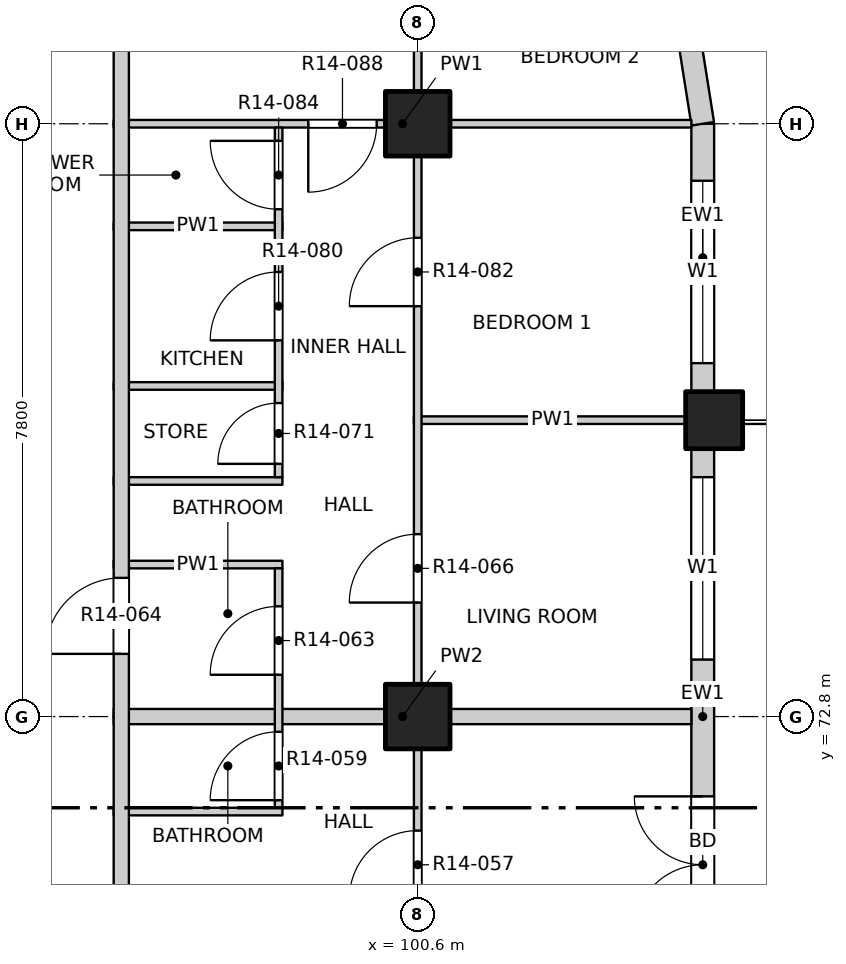
"""IFC4 building model, lengths in metres.
Left out: names, types, materials, properties, quantities, classifications, styles, units other than length and angle.
Written with IfcOpenShell. Run it as: python <this file> out.ifc"""

import sys

from ifc_helpers import new_model, si_unit, direction, frame, frame_2d, origin, origin_2d, place, context, subcontext, project, spatial, rectangle, extrude, element, fill, save


model = new_model("IFC4")
c1 = context("Model", 3, precision=1e-05, world=origin(), true_north=direction((0.0, 1.0)))
c2 = subcontext(c1, "Body", "Model", "MODEL_VIEW")
j1 = project(units=[si_unit("LENGTHUNIT", "METRE"), si_unit("PLANEANGLEUNIT", "RADIAN")], contexts=[c1])
p1 = place(None, origin())
s1 = spatial("IfcSite", under=j1, at=p1, CompositionType="ELEMENT")
p2 = place(p1, origin())
s2 = spatial("IfcBuilding", under=s1, at=p2, CompositionType="ELEMENT")
p3 = place(p2, frame((0.0, 0.0, 152.0)))
s3 = spatial("IfcBuildingStorey", under=s2, at=p3, CompositionType="ELEMENT", Elevation=152.0)
p4 = place(p3, frame((104.5, 76.7, -0.25), z_axis=(0.0, 0.0, 1.0), x_axis=(1.0, 0.0, 0.0)))
e1 = element("IfcColumn", 1, at=p4, inside=s3, PredefinedType="COLUMN", context=c2, shape_type="SweptSolid", body=[
    extrude(rectangle(XDim=0.75, YDim=0.75, at=origin_2d()), origin(), (0.0, 0.0, 1.0), 3.4),
])
for number, where, z_axis, x_axis in (
    (2, (100.6, 72.8, -0.25), (0.0, 0.0, 1.0), (1.0, 0.0, 0.0)),
    (3, (100.6, 80.6, -0.25), (0.0, 0.0, 1.0), (1.0, 0.0, 0.0)),
):
    element("IfcColumn", number, at=place(p3, frame(where, z_axis=z_axis, x_axis=x_axis)), inside=s3, PredefinedType="COLUMN", context=c2, shape_type="SweptSolid", body=[
        extrude(rectangle(XDim=0.85, YDim=0.85, at=origin_2d()), origin(), (0.0, 0.0, 1.0), 3.4),
    ])
p5 = place(p3, frame((104.35, 69.275, 0.0), z_axis=(0.0, 0.0, 1.0), x_axis=(0.0, 1.0, 0.0)))
e4 = element("IfcWall", 4, at=p5, inside=s3, PredefinedType="SOLIDWALL", context=c2, shape_type="SweptSolid", body=[
    extrude(rectangle(XDim=7.05, YDim=0.3, at=frame_2d((3.525, 0.0))), origin(), (0.0, 0.0, 1.0), 2.7),
])
p6 = place(p5, frame((0.675, 0.0, 0.0)))
e5 = element("IfcOpeningElement", 5, at=p6, cuts=e4, PredefinedType="OPENING", context=c2, shape_type="SweptSolid", body=[
    extrude(rectangle(XDim=1.8, YDim=2.4, at=frame_2d((0.9, 1.2))), frame((0.0, 0.16, 0.0), z_axis=(0.0, -1.0, 0.0), x_axis=(1.0, 0.0, 0.0)), (0.0, 0.0, 1.0), 0.32),
])
p7 = place(p5, frame((4.275, 0.0, 0.9)))
e6 = element("IfcOpeningElement", 6, at=p7, cuts=e4, PredefinedType="OPENING", context=c2, shape_type="SweptSolid", body=[
    extrude(rectangle(XDim=2.4, YDim=1.8, at=frame_2d((1.2, 0.9))), frame((0.0, 0.16, 0.0), z_axis=(0.0, -1.0, 0.0), x_axis=(1.0, 0.0, 0.0)), (0.0, 0.0, 1.0), 0.32),
])
p8 = place(p3, frame((104.35, 77.075, 0.0), z_axis=(0.0, 0.0, 1.0), x_axis=(0.0, 1.0, 0.0)))
e7 = element("IfcWall", 7, at=p8, inside=s3, PredefinedType="SOLIDWALL", context=c2, shape_type="SweptSolid", body=[
    extrude(rectangle(XDim=3.525, YDim=0.3, at=frame_2d((1.763, 0.0))), origin(), (0.0, 0.0, 1.0), 2.7),
])
p9 = place(p8, frame((0.375, 0.0, 0.9)))
e8 = element("IfcOpeningElement", 8, at=p9, cuts=e7, PredefinedType="OPENING", context=c2, shape_type="SweptSolid", body=[
    extrude(rectangle(XDim=2.4, YDim=1.8, at=frame_2d((1.2, 0.9))), frame((0.0, 0.16, 0.0), z_axis=(0.0, -1.0, 0.0), x_axis=(1.0, 0.0, 0.0)), (0.0, 0.0, 1.0), 0.32),
])
p10 = place(p3, frame((104.35, 80.6, 0.0), z_axis=(0.0, 0.0, 1.0), x_axis=(-0.156496880861, 0.987678452879, 0.0)))
e9 = element("IfcWall", 9, at=p10, inside=s3, PredefinedType="SOLIDWALL", context=c2, shape_type="SweptSolid", body=[
    extrude(rectangle(XDim=1.173, YDim=0.3, at=frame_2d((0.586, 0.0))), origin(), (0.0, 0.0, 1.0), 2.7),
])
p11 = place(p3, frame((96.6, 71.55, 0.0), z_axis=(0.0, 0.0, 1.0), x_axis=(1.0, 0.0, 0.0)))
e10 = element("IfcWall", 10, at=p11, inside=s3, PredefinedType="PARTITIONING", context=c2, shape_type="SweptSolid", body=[
    extrude(rectangle(XDim=2.22, YDim=0.1, at=frame_2d((1.11, 0.0))), origin(), (0.0, 0.0, 1.0), 3.15),
])
p12 = place(p3, frame((96.6, 72.8, 0.0), z_axis=(0.0, 0.0, 1.0), x_axis=(1.0, 0.0, 0.0)))
e11 = element("IfcWall", 11, at=p12, inside=s3, PredefinedType="PARTITIONING", context=c2, shape_type="SweptSolid", body=[
    extrude(rectangle(XDim=7.6, YDim=0.2, at=frame_2d((3.8, 0.0))), origin(), (0.0, 0.0, 1.0), 3.15),
])
for number, where, z_axis, x_axis in (
    (12, (96.6, 74.8, 0.0), (0.0, 0.0, 1.0), (1.0, 0.0, 0.0)),
    (13, (96.6, 75.9, 0.0), (0.0, 0.0, 1.0), (1.0, 0.0, 0.0)),
):
    element("IfcWall", number, at=place(p3, frame(where, z_axis=z_axis, x_axis=x_axis)), inside=s3, PredefinedType="PARTITIONING", context=c2, shape_type="SweptSolid", body=[
        extrude(rectangle(XDim=2.22, YDim=0.1, at=frame_2d((1.11, 0.0))), origin(), (0.0, 0.0, 1.0), 3.15),
    ])
p13 = place(p3, frame((100.55, 76.7, 0.0), z_axis=(0.0, 0.0, 1.0), x_axis=(1.0, 0.0, 0.0)))
e14 = element("IfcWall", 14, at=p13, inside=s3, PredefinedType="PARTITIONING", context=c2, shape_type="SweptSolid", body=[
    extrude(rectangle(XDim=3.65, YDim=0.1, at=frame_2d((1.825, 0.0))), origin(), (0.0, 0.0, 1.0), 2.55),
])
for number, where, z_axis, x_axis in (
    (15, (96.6, 77.15, 0.0), (0.0, 0.0, 1.0), (1.0, 0.0, 0.0)),
    (16, (96.6, 79.25, 0.0), (0.0, 0.0, 1.0), (1.0, 0.0, 0.0)),
):
    element("IfcWall", number, at=place(p3, frame(where, z_axis=z_axis, x_axis=x_axis)), inside=s3, PredefinedType="PARTITIONING", context=c2, shape_type="SweptSolid", body=[
        extrude(rectangle(XDim=2.22, YDim=0.1, at=frame_2d((1.11, 0.0))), origin(), (0.0, 0.0, 1.0), 3.15),
    ])
p14 = place(p3, frame((96.6, 80.6, 0.0), z_axis=(0.0, 0.0, 1.0), x_axis=(1.0, 0.0, 0.0)))
e17 = element("IfcWall", 17, at=p14, inside=s3, PredefinedType="PARTITIONING", context=c2, shape_type="SweptSolid", body=[
    extrude(rectangle(XDim=7.6, YDim=0.1, at=frame_2d((3.8, 0.0))), origin(), (0.0, 0.0, 1.0), 3.15),
])
p15 = place(p14, frame((2.56, 0.0, 0.0)))
e18 = element("IfcOpeningElement", 18, at=p15, cuts=e17, PredefinedType="OPENING", context=c2, shape_type="SweptSolid", body=[
    extrude(rectangle(XDim=0.9, YDim=2.1, at=frame_2d((0.45, 1.05))), frame((0.0, 0.06, 0.0), z_axis=(0.0, -1.0, 0.0), x_axis=(1.0, 0.0, 0.0)), (0.0, 0.0, 1.0), 0.12),
])
p16 = place(p3, frame((96.7, 49.5, 0.0), z_axis=(0.0, 0.0, 1.0), x_axis=(0.0, 1.0, 0.0)))
e19 = element("IfcWall", 19, at=p16, inside=s3, PredefinedType="PARTITIONING", context=c2, shape_type="SweptSolid", body=[
    extrude(rectangle(XDim=34.7, YDim=0.2, at=frame_2d((17.35, 0.0))), origin(), (0.0, 0.0, 1.0), 3.15),
])
p17 = place(p16, frame((3.225, 0.0, 0.0)))
e20 = element("IfcOpeningElement", 20, at=p17, cuts=e19, PredefinedType="OPENING", context=c2, shape_type="SweptSolid", body=[
    extrude(rectangle(XDim=1.0, YDim=2.1, at=frame_2d((0.5, 1.05))), frame((0.0, 0.11, 0.0), z_axis=(0.0, -1.0, 0.0), x_axis=(1.0, 0.0, 0.0)), (0.0, 0.0, 1.0), 0.22),
])
p18 = place(p16, frame((19.775, 0.0, 0.0)))
e21 = element("IfcOpeningElement", 21, at=p18, cuts=e19, PredefinedType="OPENING", context=c2, shape_type="SweptSolid", body=[
    extrude(rectangle(XDim=1.0, YDim=2.1, at=frame_2d((0.5, 1.05))), frame((0.0, 0.11, 0.0), z_axis=(0.0, -1.0, 0.0), x_axis=(1.0, 0.0, 0.0)), (0.0, 0.0, 1.0), 0.22),
])
p19 = place(p16, frame((24.125, 0.0, 0.0)))
e22 = element("IfcOpeningElement", 22, at=p19, cuts=e19, PredefinedType="OPENING", context=c2, shape_type="SweptSolid", body=[
    extrude(rectangle(XDim=1.0, YDim=2.1, at=frame_2d((0.5, 1.05))), frame((0.0, 0.11, 0.0), z_axis=(0.0, -1.0, 0.0), x_axis=(1.0, 0.0, 0.0)), (0.0, 0.0, 1.0), 0.22),
])
p20 = place(p3, frame((98.77, 71.6, 0.0), z_axis=(0.0, 0.0, 1.0), x_axis=(0.0, 1.0, 0.0)))
e23 = element("IfcWall", 23, at=p20, inside=s3, PredefinedType="PARTITIONING", context=c2, shape_type="SweptSolid", body=[
    extrude(rectangle(XDim=3.15, YDim=0.1, at=frame_2d((1.575, 0.0))), origin(), (0.0, 0.0, 1.0), 3.15),
])
p21 = place(p20, frame((0.1, 0.0, 0.0)))
e24 = element("IfcOpeningElement", 24, at=p21, cuts=e23, PredefinedType="OPENING", context=c2, shape_type="SweptSolid", body=[
    extrude(rectangle(XDim=0.9, YDim=2.1, at=frame_2d((0.45, 1.05))), frame((0.0, 0.06, 0.0), z_axis=(0.0, -1.0, 0.0), x_axis=(1.0, 0.0, 0.0)), (0.0, 0.0, 1.0), 0.12),
])
p22 = place(p20, frame((1.75, 0.0, 0.0)))
e25 = element("IfcOpeningElement", 25, at=p22, cuts=e23, PredefinedType="OPENING", context=c2, shape_type="SweptSolid", body=[
    extrude(rectangle(XDim=0.9, YDim=2.1, at=frame_2d((0.45, 1.05))), frame((0.0, 0.06, 0.0), z_axis=(0.0, -1.0, 0.0), x_axis=(1.0, 0.0, 0.0)), (0.0, 0.0, 1.0), 0.12),
])
p23 = place(p3, frame((98.77, 75.95, 0.0), z_axis=(0.0, 0.0, 1.0), x_axis=(0.0, 1.0, 0.0)))
e26 = element("IfcWall", 26, at=p23, inside=s3, PredefinedType="PARTITIONING", context=c2, shape_type="SweptSolid", body=[
    extrude(rectangle(XDim=4.6, YDim=0.1, at=frame_2d((2.3, 0.0))), origin(), (0.0, 0.0, 1.0), 3.15),
])
p24 = place(p23, frame((0.175, 0.0, 0.0)))
e27 = element("IfcOpeningElement", 27, at=p24, cuts=e26, PredefinedType="OPENING", context=c2, shape_type="SweptSolid", body=[
    extrude(rectangle(XDim=0.8, YDim=2.1, at=frame_2d((0.4, 1.05))), frame((0.0, 0.06, 0.0), z_axis=(0.0, -1.0, 0.0), x_axis=(1.0, 0.0, 0.0)), (0.0, 0.0, 1.0), 0.12),
])
p25 = place(p23, frame((1.8, 0.0, 0.0)))
e28 = element("IfcOpeningElement", 28, at=p25, cuts=e26, PredefinedType="OPENING", context=c2, shape_type="SweptSolid", body=[
    extrude(rectangle(XDim=0.9, YDim=2.1, at=frame_2d((0.45, 1.05))), frame((0.0, 0.06, 0.0), z_axis=(0.0, -1.0, 0.0), x_axis=(1.0, 0.0, 0.0)), (0.0, 0.0, 1.0), 0.12),
])
p26 = place(p23, frame((3.525, 0.0, 0.0)))
e29 = element("IfcOpeningElement", 29, at=p26, cuts=e26, PredefinedType="OPENING", context=c2, shape_type="SweptSolid", body=[
    extrude(rectangle(XDim=0.9, YDim=2.1, at=frame_2d((0.45, 1.05))), frame((0.0, 0.06, 0.0), z_axis=(0.0, -1.0, 0.0), x_axis=(1.0, 0.0, 0.0)), (0.0, 0.0, 1.0), 0.12),
])
p27 = place(p3, frame((100.6, 45.8, 0.0), z_axis=(0.0, 0.0, 1.0), x_axis=(0.0, 1.0, 0.0)))
e30 = element("IfcWall", 30, at=p27, inside=s3, PredefinedType="PARTITIONING", context=c2, shape_type="SweptSolid", body=[
    extrude(rectangle(XDim=38.4, YDim=0.1, at=frame_2d((19.2, 0.0))), origin(), (0.0, 0.0, 1.0), 3.15),
])
p28 = place(p27, frame((1.05, 0.0, 0.0)))
e31 = element("IfcOpeningElement", 31, at=p28, cuts=e30, PredefinedType="OPENING", context=c2, shape_type="SweptSolid", body=[
    extrude(rectangle(XDim=1.2, YDim=2.1, at=frame_2d((0.6, 1.05))), frame((0.0, 0.06, 0.0), z_axis=(0.0, -1.0, 0.0), x_axis=(1.0, 0.0, 0.0)), (0.0, 0.0, 1.0), 0.12),
])
p29 = place(p27, frame((5.1, 0.0, 0.0)))
e32 = element("IfcOpeningElement", 32, at=p29, cuts=e30, PredefinedType="OPENING", context=c2, shape_type="SweptSolid", body=[
    extrude(rectangle(XDim=0.9, YDim=2.1, at=frame_2d((0.45, 1.05))), frame((0.0, 0.06, 0.0), z_axis=(0.0, -1.0, 0.0), x_axis=(1.0, 0.0, 0.0)), (0.0, 0.0, 1.0), 0.12),
])
p30 = place(p27, frame((9.0, 0.0, 0.0)))
e33 = element("IfcOpeningElement", 33, at=p30, cuts=e30, PredefinedType="OPENING", context=c2, shape_type="SweptSolid", body=[
    extrude(rectangle(XDim=0.9, YDim=2.1, at=frame_2d((0.45, 1.05))), frame((0.0, 0.06, 0.0), z_axis=(0.0, -1.0, 0.0), x_axis=(1.0, 0.0, 0.0)), (0.0, 0.0, 1.0), 0.12),
])
p31 = place(p27, frame((12.9, 0.0, 0.0)))
e34 = element("IfcOpeningElement", 34, at=p31, cuts=e30, PredefinedType="OPENING", context=c2, shape_type="SweptSolid", body=[
    extrude(rectangle(XDim=0.9, YDim=2.1, at=frame_2d((0.45, 1.05))), frame((0.0, 0.06, 0.0), z_axis=(0.0, -1.0, 0.0), x_axis=(1.0, 0.0, 0.0)), (0.0, 0.0, 1.0), 0.12),
])
p32 = place(p27, frame((16.8, 0.0, 0.0)))
e35 = element("IfcOpeningElement", 35, at=p32, cuts=e30, PredefinedType="OPENING", context=c2, shape_type="SweptSolid", body=[
    extrude(rectangle(XDim=0.9, YDim=2.1, at=frame_2d((0.45, 1.05))), frame((0.0, 0.06, 0.0), z_axis=(0.0, -1.0, 0.0), x_axis=(1.0, 0.0, 0.0)), (0.0, 0.0, 1.0), 0.12),
])
p33 = place(p27, frame((20.7, 0.0, 0.0)))
e36 = element("IfcOpeningElement", 36, at=p33, cuts=e30, PredefinedType="OPENING", context=c2, shape_type="SweptSolid", body=[
    extrude(rectangle(XDim=0.9, YDim=2.1, at=frame_2d((0.45, 1.05))), frame((0.0, 0.06, 0.0), z_axis=(0.0, -1.0, 0.0), x_axis=(1.0, 0.0, 0.0)), (0.0, 0.0, 1.0), 0.12),
])
p34 = place(p27, frame((24.6, 0.0, 0.0)))
e37 = element("IfcOpeningElement", 37, at=p34, cuts=e30, PredefinedType="OPENING", context=c2, shape_type="SweptSolid", body=[
    extrude(rectangle(XDim=0.9, YDim=2.1, at=frame_2d((0.45, 1.05))), frame((0.0, 0.06, 0.0), z_axis=(0.0, -1.0, 0.0), x_axis=(1.0, 0.0, 0.0)), (0.0, 0.0, 1.0), 0.12),
])
p35 = place(p27, frame((28.5, 0.0, 0.0)))
e38 = element("IfcOpeningElement", 38, at=p35, cuts=e30, PredefinedType="OPENING", context=c2, shape_type="SweptSolid", body=[
    extrude(rectangle(XDim=0.9, YDim=2.1, at=frame_2d((0.45, 1.05))), frame((0.0, 0.06, 0.0), z_axis=(0.0, -1.0, 0.0), x_axis=(1.0, 0.0, 0.0)), (0.0, 0.0, 1.0), 0.12),
])
p36 = place(p27, frame((32.4, 0.0, 0.0)))
e39 = element("IfcOpeningElement", 39, at=p36, cuts=e30, PredefinedType="OPENING", context=c2, shape_type="SweptSolid", body=[
    extrude(rectangle(XDim=0.9, YDim=2.1, at=frame_2d((0.45, 1.05))), frame((0.0, 0.06, 0.0), z_axis=(0.0, -1.0, 0.0), x_axis=(1.0, 0.0, 0.0)), (0.0, 0.0, 1.0), 0.12),
])
p37 = place(p27, frame((36.15, 0.0, 0.0)))
e40 = element("IfcOpeningElement", 40, at=p37, cuts=e30, PredefinedType="OPENING", context=c2, shape_type="SweptSolid", body=[
    extrude(rectangle(XDim=1.2, YDim=2.1, at=frame_2d((0.6, 1.05))), frame((0.0, 0.06, 0.0), z_axis=(0.0, -1.0, 0.0), x_axis=(1.0, 0.0, 0.0)), (0.0, 0.0, 1.0), 0.12),
])
p38 = place(p6, origin())
e41 = element("IfcDoor", 41, at=p38, inside=s3, OperationType="DOUBLE_DOOR_SINGLE_SWING", PredefinedType="DOOR", context=c2, shape_type="SweptSolid", body=[
    extrude(rectangle(XDim=1.8, YDim=2.4, at=frame_2d((0.9, 1.2))), frame((0.0, 0.025, 0.0), z_axis=(0.0, -1.0, 0.0), x_axis=(1.0, 0.0, 0.0)), (0.0, 0.0, 1.0), 0.05),
])
fill(e5, e41)
p39 = place(p7, origin())
e42 = element("IfcWindow", 42, at=p39, inside=s3, PartitioningType="DOUBLE_PANEL_VERTICAL", PredefinedType="WINDOW", context=c2, shape_type="SweptSolid", body=[
    extrude(rectangle(XDim=2.4, YDim=1.8, at=frame_2d((1.2, 0.9))), frame((0.0, 0.03, 0.0), z_axis=(0.0, -1.0, 0.0), x_axis=(1.0, 0.0, 0.0)), (0.0, 0.0, 1.0), 0.06),
])
fill(e6, e42)
p40 = place(p9, origin())
e43 = element("IfcWindow", 43, at=p40, inside=s3, PartitioningType="DOUBLE_PANEL_VERTICAL", PredefinedType="WINDOW", context=c2, shape_type="SweptSolid", body=[
    extrude(rectangle(XDim=2.4, YDim=1.8, at=frame_2d((1.2, 0.9))), frame((0.0, 0.03, 0.0), z_axis=(0.0, -1.0, 0.0), x_axis=(1.0, 0.0, 0.0)), (0.0, 0.0, 1.0), 0.06),
])
fill(e8, e43)
p41 = place(p34, origin())
e44 = element("IfcDoor", 44, at=p41, inside=s3, OperationType="SINGLE_SWING_LEFT", PredefinedType="DOOR", context=c2, shape_type="SweptSolid", body=[
    extrude(rectangle(XDim=0.9, YDim=2.1, at=frame_2d((0.45, 1.05))), frame((0.0, 0.025, 0.0), z_axis=(0.0, -1.0, 0.0), x_axis=(1.0, 0.0, 0.0)), (0.0, 0.0, 1.0), 0.05),
])
fill(e37, e44)
p42 = place(p21, origin())
e45 = element("IfcDoor", 45, at=p42, inside=s3, OperationType="SINGLE_SWING_LEFT", PredefinedType="DOOR", context=c2, shape_type="SweptSolid", body=[
    extrude(rectangle(XDim=0.9, YDim=2.1, at=frame_2d((0.45, 1.05))), frame((0.0, 0.025, 0.0), z_axis=(0.0, -1.0, 0.0), x_axis=(1.0, 0.0, 0.0)), (0.0, 0.0, 1.0), 0.05),
])
fill(e24, e45)
p43 = place(p22, origin())
e46 = element("IfcDoor", 46, at=p43, inside=s3, OperationType="SINGLE_SWING_LEFT", PredefinedType="DOOR", context=c2, shape_type="SweptSolid", body=[
    extrude(rectangle(XDim=0.9, YDim=2.1, at=frame_2d((0.45, 1.05))), frame((0.0, 0.025, 0.0), z_axis=(0.0, -1.0, 0.0), x_axis=(1.0, 0.0, 0.0)), (0.0, 0.0, 1.0), 0.05),
])
fill(e25, e46)
p44 = place(p19, origin())
e47 = element("IfcDoor", 47, at=p44, inside=s3, OperationType="SINGLE_SWING_RIGHT", PredefinedType="DOOR", context=c2, shape_type="SweptSolid", body=[
    extrude(rectangle(XDim=1.0, YDim=2.1, at=frame_2d((0.5, 1.05))), frame((0.0, 0.025, 0.0), z_axis=(0.0, -1.0, 0.0), x_axis=(1.0, 0.0, 0.0)), (0.0, 0.0, 1.0), 0.05),
])
fill(e22, e47)
p45 = place(p35, origin())
e48 = element("IfcDoor", 48, at=p45, inside=s3, OperationType="SINGLE_SWING_LEFT", PredefinedType="DOOR", context=c2, shape_type="SweptSolid", body=[
    extrude(rectangle(XDim=0.9, YDim=2.1, at=frame_2d((0.45, 1.05))), frame((0.0, 0.025, 0.0), z_axis=(0.0, -1.0, 0.0), x_axis=(1.0, 0.0, 0.0)), (0.0, 0.0, 1.0), 0.05),
])
fill(e38, e48)
p46 = place(p24, origin())
e49 = element("IfcDoor", 49, at=p46, inside=s3, OperationType="SINGLE_SWING_LEFT", PredefinedType="DOOR", context=c2, shape_type="SweptSolid", body=[
    extrude(rectangle(XDim=0.8, YDim=2.1, at=frame_2d((0.4, 1.05))), frame((0.0, 0.025, 0.0), z_axis=(0.0, -1.0, 0.0), x_axis=(1.0, 0.0, 0.0)), (0.0, 0.0, 1.0), 0.05),
])
fill(e27, e49)
p47 = place(p25, origin())
e50 = element("IfcDoor", 50, at=p47, inside=s3, OperationType="SINGLE_SWING_LEFT", PredefinedType="DOOR", context=c2, shape_type="SweptSolid", body=[
    extrude(rectangle(XDim=0.9, YDim=2.1, at=frame_2d((0.45, 1.05))), frame((0.0, 0.025, 0.0), z_axis=(0.0, -1.0, 0.0), x_axis=(1.0, 0.0, 0.0)), (0.0, 0.0, 1.0), 0.05),
])
fill(e28, e50)
p48 = place(p36, origin())
e51 = element("IfcDoor", 51, at=p48, inside=s3, OperationType="SINGLE_SWING_LEFT", PredefinedType="DOOR", context=c2, shape_type="SweptSolid", body=[
    extrude(rectangle(XDim=0.9, YDim=2.1, at=frame_2d((0.45, 1.05))), frame((0.0, 0.025, 0.0), z_axis=(0.0, -1.0, 0.0), x_axis=(1.0, 0.0, 0.0)), (0.0, 0.0, 1.0), 0.05),
])
fill(e39, e51)
p49 = place(p26, origin())
e52 = element("IfcDoor", 52, at=p49, inside=s3, OperationType="SINGLE_SWING_RIGHT", PredefinedType="DOOR", context=c2, shape_type="SweptSolid", body=[
    extrude(rectangle(XDim=0.9, YDim=2.1, at=frame_2d((0.45, 1.05))), frame((0.0, 0.025, 0.0), z_axis=(0.0, -1.0, 0.0), x_axis=(1.0, 0.0, 0.0)), (0.0, 0.0, 1.0), 0.05),
])
fill(e29, e52)
p50 = place(p15, origin())
e53 = element("IfcDoor", 53, at=p50, inside=s3, OperationType="SINGLE_SWING_RIGHT", PredefinedType="DOOR", context=c2, shape_type="SweptSolid", body=[
    extrude(rectangle(XDim=0.9, YDim=2.1, at=frame_2d((0.45, 1.05))), frame((0.0, 0.025, 0.0), z_axis=(0.0, -1.0, 0.0), x_axis=(1.0, 0.0, 0.0)), (0.0, 0.0, 1.0), 0.05),
])
fill(e18, e53)
save(model, sys.argv[1])
